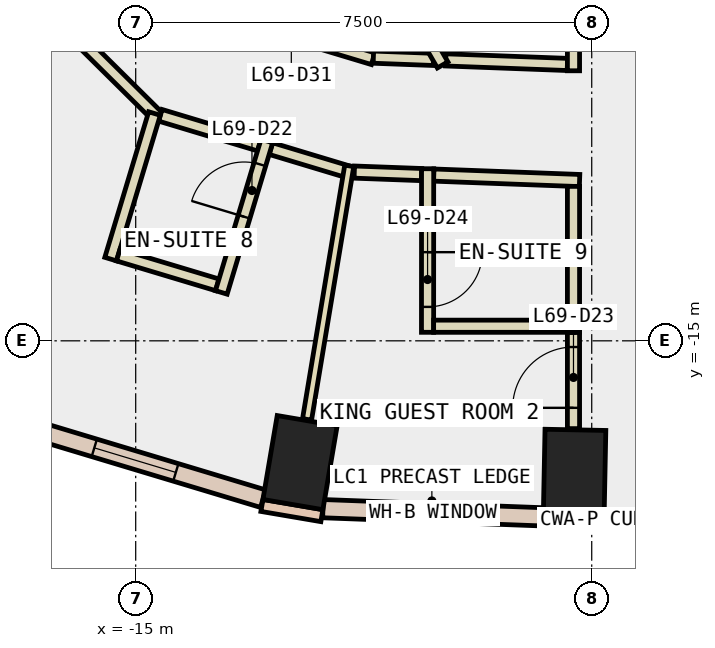
"""IFC4 building model, lengths in metres.
Left out: names, types, materials, properties, quantities, classifications, styles, units other than length and angle.
Written with IfcOpenShell. Run it as: python <this file> out.ifc"""

import sys

from ifc_helpers import new_model, si_unit, direction, frame, frame_2d, origin, origin_2d, place, context, subcontext, project, spatial, rectangle, extrude, element, fill, save


model = new_model("IFC4")
c1 = context("Model", 3, precision=1e-05, world=origin(), true_north=direction((0.0, 1.0)))
c2 = subcontext(c1, "Body", "Model", "MODEL_VIEW")
j1 = project(units=[si_unit("LENGTHUNIT", "METRE"), si_unit("PLANEANGLEUNIT", "RADIAN")], contexts=[c1])
p1 = place(None, origin())
s1 = spatial("IfcSite", under=j1, at=p1, CompositionType="ELEMENT")
p2 = place(p1, origin())
s2 = spatial("IfcBuilding", under=s1, at=p2, CompositionType="ELEMENT")
p3 = place(p2, frame((0.0, 0.0, 297.2)))
s3 = spatial("IfcBuildingStorey", under=s2, at=p3, CompositionType="ELEMENT", Elevation=297.2)
for number, where, z_axis, x_axis in (
    (1, (-12.297, -17.003, -0.34), (0.0, 0.0, 1.0), (-0.986, 0.168, 0.0)),
    (2, (-7.782, -17.164, -0.34), (0.0, 0.0, 1.0), (-1.0, 0.02, 0.0)),
):
    element("IfcColumn", number, at=place(p3, frame(where, z_axis=z_axis, x_axis=x_axis)), inside=s3, PredefinedType="COLUMN", context=c2, shape_type="SweptSolid", body=[
        extrude(rectangle(XDim=1.0, YDim=1.4, at=origin_2d()), origin(), (0.0, 0.0, 1.0), 3.6),
    ])
for number, where, z_axis, x_axis in (
    (3, (-12.924, -17.707, 0.0), (0.0, 0.0, 1.0), (0.986, -0.168, 0.0)),
    (4, (-8.298, -17.954, 0.0), (0.0, 0.0, 1.0), (1.0, -0.02, 0.0)),
):
    element("IfcWall", number, at=place(p3, frame(where, z_axis=z_axis, x_axis=x_axis)), inside=s3, PredefinedType="STANDARD", context=c2, shape_type="SweptSolid", body=[
        extrude(rectangle(XDim=1.0, YDim=0.2, at=frame_2d((0.5, 0.0))), origin(), (0.0, 0.0, 1.0), 3.26),
    ])
p4 = place(p3, frame((-11.92, -17.76, 0.0), z_axis=(0.0, 0.0, 1.0), x_axis=(0.999306787149, -0.037228284377, 0.0)))
e5 = element("IfcWall", 5, at=p4, inside=s3, PredefinedType="STANDARD", context=c2, shape_type="SweptSolid", body=[
    extrude(rectangle(XDim=3.626, YDim=0.3, at=frame_2d((1.813, 0.0))), origin(), (0.0, 0.0, 1.0), 3.26),
])
p5 = place(p4, frame((1.113, 0.0, 0.9)))
e6 = element("IfcOpeningElement", 6, at=p5, cuts=e5, PredefinedType="OPENING", context=c2, shape_type="SweptSolid", body=[
    extrude(rectangle(XDim=1.4, YDim=2.0, at=frame_2d((0.7, 1.0))), frame((0.0, 0.16, 0.0), z_axis=(0.0, -1.0, 0.0), x_axis=(1.0, 0.0, 0.0)), (0.0, 0.0, 1.0), 0.32),
])
p6 = place(p3, frame((-17.117, -16.328, 0.0), z_axis=(0.0, 0.0, 1.0), x_axis=(0.957563190743, -0.288223412884, 0.0)))
e7 = element("IfcWall", 7, at=p6, inside=s3, PredefinedType="STANDARD", context=c2, shape_type="SweptSolid", body=[
    extrude(rectangle(XDim=4.4, YDim=0.3, at=frame_2d((2.2, 0.0))), origin(), (0.0, 0.0, 1.0), 3.26),
])
p7 = place(p6, frame((1.5, 0.0, 0.9)))
e8 = element("IfcOpeningElement", 8, at=p7, cuts=e7, PredefinedType="OPENING", context=c2, shape_type="SweptSolid", body=[
    extrude(rectangle(XDim=1.4, YDim=2.0, at=frame_2d((0.7, 1.0))), frame((0.0, 0.16, 0.0), z_axis=(0.0, -1.0, 0.0), x_axis=(1.0, 0.0, 0.0)), (0.0, 0.0, 1.0), 0.32),
])
p8 = place(p3, frame((-9.902, -10.38, 0.0), z_axis=(0.0, 0.0, 1.0), x_axis=(0.999295503749, -0.037529937222, 0.0)))
e9 = element("IfcWall", 9, at=p8, inside=s3, PredefinedType="PARTITIONING", context=c2, shape_type="SweptSolid", body=[
    extrude(rectangle(XDim=2.004, YDim=0.2, at=frame_2d((1.002, 0.0))), origin(), (0.0, 0.0, 1.0), 3.26),
])
p9 = place(p3, frame((-13.787, -9.55, 0.0), z_axis=(0.0, 0.0, 1.0), x_axis=(0.957493454064, -0.288454997225, 0.0)))
e10 = element("IfcWall", 10, at=p9, inside=s3, PredefinedType="PARTITIONING", context=c2, shape_type="SweptSolid", body=[
    extrude(rectangle(XDim=2.812, YDim=0.2, at=frame_2d((1.406, 0.0))), origin(), (0.0, 0.0, 1.0), 3.26),
])
p10 = place(p9, frame((0.906, 0.0, 0.0)))
e11 = element("IfcOpeningElement", 11, at=p10, cuts=e10, PredefinedType="OPENING", context=c2, shape_type="SweptSolid", body=[
    extrude(rectangle(XDim=1.0, YDim=2.1, at=frame_2d((0.5, 1.05))), frame((0.0, 0.11, 0.0), z_axis=(0.0, -1.0, 0.0), x_axis=(1.0, 0.0, 0.0)), (0.0, 0.0, 1.0), 0.22),
])
p11 = place(p3, frame((-11.091, -10.335, 0.0), z_axis=(0.0, 0.0, 1.0), x_axis=(0.999296807198, -0.037495214686, 0.0)))
e12 = element("IfcWall", 12, at=p11, inside=s3, PredefinedType="PARTITIONING", context=c2, shape_type="SweptSolid", body=[
    extrude(rectangle(XDim=0.99, YDim=0.2, at=frame_2d((0.495, 0.0))), origin(), (0.0, 0.0, 1.0), 3.26),
])
p12 = place(p3, frame((-11.481, -12.229, 0.0), z_axis=(0.0, 0.0, 1.0), x_axis=(-0.957537616046, 0.288308365917, 0.0)))
e13 = element("IfcWall", 13, at=p12, inside=s3, PredefinedType="PARTITIONING", context=c2, shape_type="SweptSolid", body=[
    extrude(rectangle(XDim=1.352, YDim=0.2, at=frame_2d((0.676, 0.0))), origin(), (0.0, 0.0, 1.0), 3.26),
])
p13 = place(p3, frame((-14.62, -11.333, 0.0), z_axis=(0.0, 0.0, 1.0), x_axis=(-0.710808598142, 0.703385482369, 0.0)))
e14 = element("IfcWall", 14, at=p13, inside=s3, PredefinedType="PARTITIONING", context=c2, shape_type="SweptSolid", body=[
    extrude(rectangle(XDim=2.697, YDim=0.2, at=frame_2d((1.349, 0.0))), origin(), (0.0, 0.0, 1.0), 3.26),
])
p14 = place(p3, frame((-12.968, -11.781, 0.0), z_axis=(0.0, 0.0, 1.0), x_axis=(-0.957517271828, 0.288375925054, 0.0)))
e15 = element("IfcWall", 15, at=p14, inside=s3, PredefinedType="PARTITIONING", context=c2, shape_type="SweptSolid", body=[
    extrude(rectangle(XDim=1.699, YDim=0.2, at=frame_2d((0.85, 0.0))), origin(), (0.0, 0.0, 1.0), 3.26),
])
p15 = place(p3, frame((-10.299, -12.266, 0.0), z_axis=(0.0, 0.0, 1.0), x_axis=(-0.999313019426, 0.03706061529, 0.0)))
e16 = element("IfcWall", 16, at=p15, inside=s3, PredefinedType="PARTITIONING", context=c2, shape_type="SweptSolid", body=[
    extrude(rectangle(XDim=1.107, YDim=0.2, at=frame_2d((0.553, 0.0))), origin(), (0.0, 0.0, 1.0), 3.26),
])
p16 = place(p3, frame((-7.7, -12.364, 0.0), z_axis=(0.0, 0.0, 1.0), x_axis=(-0.999295758095, 0.037523164215, 0.0)))
e17 = element("IfcWall", 17, at=p16, inside=s3, PredefinedType="PARTITIONING", context=c2, shape_type="SweptSolid", body=[
    extrude(rectangle(XDim=2.401, YDim=0.2, at=frame_2d((1.2, 0.0))), origin(), (0.0, 0.0, 1.0), 3.26),
])
p17 = place(p3, frame((-7.8, -10.559, 0.0), z_axis=(0.0, 0.0, 1.0), x_axis=(0.0, 1.0, 0.0)))
e18 = element("IfcWall", 18, at=p17, inside=s3, PredefinedType="PARTITIONING", context=c2, shape_type="SweptSolid", body=[
    extrude(rectangle(XDim=4.66, YDim=0.2, at=frame_2d((2.33, 0.0))), origin(), (0.0, 0.0, 1.0), 3.26),
])
p18 = place(p17, frame((1.83, 0.0, 0.0)))
e19 = element("IfcOpeningElement", 19, at=p18, cuts=e18, PredefinedType="OPENING", context=c2, shape_type="SweptSolid", body=[
    extrude(rectangle(XDim=1.0, YDim=2.1, at=frame_2d((0.5, 1.05))), frame((0.0, 0.11, 0.0), z_axis=(0.0, -1.0, 0.0), x_axis=(1.0, 0.0, 0.0)), (0.0, 0.0, 1.0), 0.22),
])
p19 = place(p3, frame((-7.8, -16.444, 0.0), z_axis=(0.0, 0.0, 1.0), x_axis=(0.0, 1.0, 0.0)))
e20 = element("IfcWall", 20, at=p19, inside=s3, PredefinedType="PARTITIONING", context=c2, shape_type="SweptSolid", body=[
    extrude(rectangle(XDim=1.584, YDim=0.2, at=frame_2d((0.792, 0.0))), origin(), (0.0, 0.0, 1.0), 3.26),
])
p20 = place(p19, frame((0.342, 0.0, 0.0)))
e21 = element("IfcOpeningElement", 21, at=p20, cuts=e20, PredefinedType="OPENING", context=c2, shape_type="SweptSolid", body=[
    extrude(rectangle(XDim=1.0, YDim=2.1, at=frame_2d((0.5, 1.05))), frame((0.0, 0.11, 0.0), z_axis=(0.0, -1.0, 0.0), x_axis=(1.0, 0.0, 0.0)), (0.0, 0.0, 1.0), 0.22),
])
p21 = place(p3, frame((-7.8, -14.86, 0.0), z_axis=(0.0, 0.0, 1.0), x_axis=(0.0, 1.0, 0.0)))
e22 = element("IfcWall", 22, at=p21, inside=s3, PredefinedType="PARTITIONING", context=c2, shape_type="SweptSolid", body=[
    extrude(rectangle(XDim=2.4, YDim=0.2, at=frame_2d((1.2, 0.0))), origin(), (0.0, 0.0, 1.0), 3.26),
])
p22 = place(p3, frame((-9.952, -10.463, 0.0), z_axis=(0.0, 0.0, 1.0), x_axis=(-0.499837150608, 0.866119404512, 0.0)))
e23 = element("IfcWall", 23, at=p22, inside=s3, PredefinedType="PARTITIONING", context=c2, shape_type="SweptSolid", body=[
    extrude(rectangle(XDim=3.685, YDim=0.2, at=frame_2d((1.843, 0.0))), origin(), (0.0, 0.0, 1.0), 3.26),
])
p23 = place(p3, frame((-14.691, -11.262, 0.0), z_axis=(0.0, 0.0, 1.0), x_axis=(-0.288440595492, -0.95749779262, 0.0)))
e24 = element("IfcWall", 24, at=p23, inside=s3, PredefinedType="PARTITIONING", context=c2, shape_type="SweptSolid", body=[
    extrude(rectangle(XDim=2.5, YDim=0.2, at=frame_2d((1.25, 0.0))), origin(), (0.0, 0.0, 1.0), 3.26),
])
p24 = place(p3, frame((-15.287, -13.59, 0.0), z_axis=(0.0, 0.0, 1.0), x_axis=(0.957735328181, -0.287650901536, 0.0)))
e25 = element("IfcWall", 25, at=p24, inside=s3, PredefinedType="PARTITIONING", context=c2, shape_type="SweptSolid", body=[
    extrude(rectangle(XDim=1.7, YDim=0.2, at=frame_2d((0.85, 0.0))), origin(), (0.0, 0.0, 1.0), 3.26),
])
p25 = place(p3, frame((-13.592, -14.204, 0.0), z_axis=(0.0, 0.0, 1.0), x_axis=(0.288062768188, 0.95761152958, 0.0)))
e26 = element("IfcWall", 26, at=p25, inside=s3, PredefinedType="PARTITIONING", context=c2, shape_type="SweptSolid", body=[
    extrude(rectangle(XDim=2.6, YDim=0.2, at=frame_2d((1.3, 0.0))), origin(), (0.0, 0.0, 1.0), 3.26),
])
p26 = place(p25, frame((1.3, 0.0, 0.0)))
e27 = element("IfcOpeningElement", 27, at=p26, cuts=e26, PredefinedType="OPENING", context=c2, shape_type="SweptSolid", body=[
    extrude(rectangle(XDim=0.9, YDim=2.1, at=frame_2d((0.45, 1.05))), frame((0.0, 0.11, 0.0), z_axis=(0.0, -1.0, 0.0), x_axis=(1.0, 0.0, 0.0)), (0.0, 0.0, 1.0), 0.22),
])
p27 = place(p3, frame((-11.488, -12.123, 0.0), z_axis=(0.0, 0.0, 1.0), x_axis=(-0.164174159643, -0.986431368776, 0.0)))
e28 = element("IfcWall", 28, at=p27, inside=s3, PredefinedType="PARTITIONING", context=c2, shape_type="SweptSolid", body=[
    extrude(rectangle(XDim=4.226, YDim=0.15, at=frame_2d((2.113, 0.0))), origin(), (0.0, 0.0, 1.0), 3.26),
])
p28 = place(p3, frame((-10.199, -12.17, 0.0), z_axis=(0.0, 0.0, 1.0), x_axis=(-0.000363009324, -0.999999934112, 0.0)))
e29 = element("IfcWall", 29, at=p28, inside=s3, PredefinedType="PARTITIONING", context=c2, shape_type="SweptSolid", body=[
    extrude(rectangle(XDim=2.69, YDim=0.2, at=frame_2d((1.345, 0.0))), origin(), (0.0, 0.0, 1.0), 3.26),
])
p29 = place(p28, frame((1.372, 0.0, 0.0)))
e30 = element("IfcOpeningElement", 30, at=p29, cuts=e29, PredefinedType="OPENING", context=c2, shape_type="SweptSolid", body=[
    extrude(rectangle(XDim=0.9, YDim=2.1, at=frame_2d((0.45, 1.05))), frame((0.0, 0.11, 0.0), z_axis=(0.0, -1.0, 0.0), x_axis=(1.0, 0.0, 0.0)), (0.0, 0.0, 1.0), 0.22),
])
p30 = place(p3, frame((-10.1, -14.76, 0.0), z_axis=(0.0, 0.0, 1.0), x_axis=(1.0, 0.0, 0.0)))
e31 = element("IfcWall", 31, at=p30, inside=s3, PredefinedType="PARTITIONING", context=c2, shape_type="SweptSolid", body=[
    extrude(rectangle(XDim=2.3, YDim=0.2, at=frame_2d((1.15, 0.0))), origin(), (0.0, 0.0, 1.0), 3.26),
])
p31 = place(p5, origin())
e32 = element("IfcWindow", 32, at=p31, inside=s3, PartitioningType="SINGLE_PANEL", PredefinedType="WINDOW", context=c2, shape_type="SweptSolid", body=[
    extrude(rectangle(XDim=1.4, YDim=2.0, at=frame_2d((0.7, 1.0))), frame((0.0, 0.03, 0.0), z_axis=(0.0, -1.0, 0.0), x_axis=(1.0, 0.0, 0.0)), (0.0, 0.0, 1.0), 0.06),
])
fill(e6, e32)
p32 = place(p7, origin())
e33 = element("IfcWindow", 33, at=p32, inside=s3, PartitioningType="SINGLE_PANEL", PredefinedType="WINDOW", context=c2, shape_type="SweptSolid", body=[
    extrude(rectangle(XDim=1.4, YDim=2.0, at=frame_2d((0.7, 1.0))), frame((0.0, 0.03, 0.0), z_axis=(0.0, -1.0, 0.0), x_axis=(1.0, 0.0, 0.0)), (0.0, 0.0, 1.0), 0.06),
])
fill(e8, e33)
p33 = place(p26, origin())
e34 = element("IfcDoor", 34, at=p33, inside=s3, OperationType="SINGLE_SWING_RIGHT", PredefinedType="DOOR", context=c2, shape_type="SweptSolid", body=[
    extrude(rectangle(XDim=0.9, YDim=2.1, at=frame_2d((0.45, 1.05))), frame((0.0, 0.025, 0.0), z_axis=(0.0, -1.0, 0.0), x_axis=(1.0, 0.0, 0.0)), (0.0, 0.0, 1.0), 0.05),
])
fill(e27, e34)
p34 = place(p20, origin())
e35 = element("IfcDoor", 35, at=p34, inside=s3, OperationType="SINGLE_SWING_RIGHT", PredefinedType="DOOR", context=c2, shape_type="SweptSolid", body=[
    extrude(rectangle(XDim=1.0, YDim=2.1, at=frame_2d((0.5, 1.05))), frame((0.0, 0.025, 0.0), z_axis=(0.0, -1.0, 0.0), x_axis=(1.0, 0.0, 0.0)), (0.0, 0.0, 1.0), 0.05),
])
fill(e21, e35)
p35 = place(p29, origin())
e36 = element("IfcDoor", 36, at=p35, inside=s3, OperationType="SINGLE_SWING_RIGHT", PredefinedType="DOOR", context=c2, shape_type="SweptSolid", body=[
    extrude(rectangle(XDim=0.9, YDim=2.1, at=frame_2d((0.45, 1.05))), frame((0.0, 0.025, 0.0), z_axis=(0.0, -1.0, 0.0), x_axis=(1.0, 0.0, 0.0)), (0.0, 0.0, 1.0), 0.05),
])
fill(e30, e36)
save(model, sys.argv[1])
